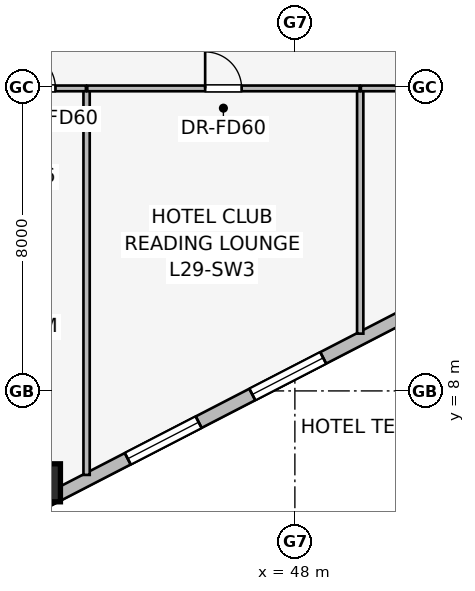
"""IFC4 building model, lengths in metres.
Left out: names, types, materials, properties, quantities, classifications, styles, units other than length and angle.
Written with IfcOpenShell. Run it as: python <this file> out.ifc"""

import sys

from ifc_helpers import new_model, si_unit, direction, frame, frame_2d, origin, origin_2d, place, context, subcontext, project, spatial, rectangle, extrude, element, fill, save


model = new_model("IFC4")
c1 = context("Model", 3, precision=1e-05, world=origin(), true_north=direction((0.0, 1.0)))
c2 = subcontext(c1, "Body", "Model", "MODEL_VIEW")
j1 = project(units=[si_unit("LENGTHUNIT", "METRE"), si_unit("PLANEANGLEUNIT", "RADIAN")], contexts=[c1])
p1 = place(None, origin())
s1 = spatial("IfcSite", under=j1, at=p1, CompositionType="ELEMENT")
p2 = place(p1, origin())
s2 = spatial("IfcBuilding", under=s1, at=p2, CompositionType="ELEMENT")
p3 = place(p2, frame((0.0, 0.0, 111.9)))
s3 = spatial("IfcBuildingStorey", under=s2, at=p3, CompositionType="ELEMENT", Elevation=111.9)
p4 = place(p3, frame((41.331, 5.582, 0.0), z_axis=(0.0, 0.0, 1.0), x_axis=(1.0, 0.0, 0.0)))
e1 = element("IfcColumn", 1, at=p4, inside=s3, PredefinedType="COLUMN", context=c2, shape_type="SweptSolid", body=[
    extrude(rectangle(XDim=1.0, YDim=1.0, at=origin_2d()), origin(), (0.0, 0.0, 1.0), 3.45),
])
p5 = place(p3, frame((54.831, 12.01, 0.0), z_axis=(0.0, 0.0, 1.0), x_axis=(-0.888613612362, -0.458656568606, 0.0)))
e2 = element("IfcWall", 2, at=p5, inside=s3, PredefinedType="STANDARD", context=c2, shape_type="SweptSolid", body=[
    extrude(rectangle(XDim=18.681, YDim=0.34, at=frame_2d((9.34, 0.0))), origin(), (0.0, 0.0, 1.0), 3.16),
])
p6 = place(p5, frame((1.023, 0.0, 0.75)))
e3 = element("IfcOpeningElement", 3, at=p6, cuts=e2, PredefinedType="OPENING", context=c2, shape_type="SweptSolid", body=[
    extrude(rectangle(XDim=1.6, YDim=1.55, at=frame_2d((0.8, 0.775))), frame((0.0, 0.18, 0.0), z_axis=(0.0, -1.0, 0.0), x_axis=(1.0, 0.0, 0.0)), (0.0, 0.0, 1.0), 0.36),
])
p7 = place(p5, frame((6.848, 0.0, 0.75)))
e4 = element("IfcOpeningElement", 4, at=p7, cuts=e2, PredefinedType="OPENING", context=c2, shape_type="SweptSolid", body=[
    extrude(rectangle(XDim=2.1, YDim=1.5, at=frame_2d((1.05, 0.75))), frame((0.0, 0.18, 0.0), z_axis=(0.0, -1.0, 0.0), x_axis=(1.0, 0.0, 0.0)), (0.0, 0.0, 1.0), 0.36),
])
p8 = place(p5, frame((10.536, 0.0, 0.75)))
e5 = element("IfcOpeningElement", 5, at=p8, cuts=e2, PredefinedType="OPENING", context=c2, shape_type="SweptSolid", body=[
    extrude(rectangle(XDim=2.1, YDim=1.5, at=frame_2d((1.05, 0.75))), frame((0.0, 0.18, 0.0), z_axis=(0.0, -1.0, 0.0), x_axis=(1.0, 0.0, 0.0)), (0.0, 0.0, 1.0), 0.36),
])
p9 = place(p5, frame((16.058, 0.0, 0.75)))
e6 = element("IfcOpeningElement", 6, at=p9, cuts=e2, PredefinedType="OPENING", context=c2, shape_type="SweptSolid", body=[
    extrude(rectangle(XDim=1.6, YDim=1.55, at=frame_2d((0.8, 0.775))), frame((0.0, 0.18, 0.0), z_axis=(0.0, -1.0, 0.0), x_axis=(1.0, 0.0, 0.0)), (0.0, 0.0, 1.0), 0.36),
])
p10 = place(p3, frame((42.519, 5.79, 0.0), z_axis=(0.0, 0.0, 1.0), x_axis=(0.0, 1.0, 0.0)))
e7 = element("IfcWall", 7, at=p10, inside=s3, PredefinedType="PARTITIONING", context=c2, shape_type="SweptSolid", body=[
    extrude(rectangle(XDim=10.14, YDim=0.165, at=frame_2d((5.07, 0.0))), origin(), (0.0, 0.0, 1.0), 3.16),
])
p11 = place(p3, frame((49.719, 9.507, 0.0), z_axis=(0.0, 0.0, 1.0), x_axis=(0.0, 1.0, 0.0)))
e8 = element("IfcWall", 8, at=p11, inside=s3, PredefinedType="PARTITIONING", context=c2, shape_type="SweptSolid", body=[
    extrude(rectangle(XDim=6.423, YDim=0.165, at=frame_2d((3.211, 0.0))), origin(), (0.0, 0.0, 1.0), 3.16),
])
p12 = place(p3, frame((37.738, 15.96, 0.0), z_axis=(0.0, 0.0, 1.0), x_axis=(1.0, 0.0, 0.0)))
e9 = element("IfcWall", 9, at=p12, inside=s3, PredefinedType="PARTITIONING", context=c2, shape_type="SweptSolid", body=[
    extrude(rectangle(XDim=4.763, YDim=0.15, at=frame_2d((2.381, 0.0))), origin(), (0.0, 0.0, 1.0), 3.16),
])
p13 = place(p12, frame((3.002, 0.0, 0.0)))
e10 = element("IfcOpeningElement", 10, at=p13, cuts=e9, PredefinedType="OPENING", context=c2, shape_type="SweptSolid", body=[
    extrude(rectangle(XDim=0.96, YDim=2.0, at=frame_2d((0.48, 1.0))), frame((0.0, 0.085, 0.0), z_axis=(0.0, -1.0, 0.0), x_axis=(1.0, 0.0, 0.0)), (0.0, 0.0, 1.0), 0.17),
])
p14 = place(p3, frame((42.537, 15.96, 0.0), z_axis=(0.0, 0.0, 1.0), x_axis=(1.0, 0.0, 0.0)))
e11 = element("IfcWall", 11, at=p14, inside=s3, PredefinedType="PARTITIONING", context=c2, shape_type="SweptSolid", body=[
    extrude(rectangle(XDim=7.164, YDim=0.15, at=frame_2d((3.582, 0.0))), origin(), (0.0, 0.0, 1.0), 3.16),
])
p15 = place(p14, frame((3.102, 0.0, 0.0)))
e12 = element("IfcOpeningElement", 12, at=p15, cuts=e11, PredefinedType="OPENING", context=c2, shape_type="SweptSolid", body=[
    extrude(rectangle(XDim=0.96, YDim=2.0, at=frame_2d((0.48, 1.0))), frame((0.0, 0.085, 0.0), z_axis=(0.0, -1.0, 0.0), x_axis=(1.0, 0.0, 0.0)), (0.0, 0.0, 1.0), 0.17),
])
p16 = place(p3, frame((49.737, 15.96, 0.0), z_axis=(0.0, 0.0, 1.0), x_axis=(1.0, 0.0, 0.0)))
e13 = element("IfcWall", 13, at=p16, inside=s3, PredefinedType="PARTITIONING", context=c2, shape_type="SweptSolid", body=[
    extrude(rectangle(XDim=7.471, YDim=0.15, at=frame_2d((3.735, 0.0))), origin(), (0.0, 0.0, 1.0), 3.16),
])
p17 = place(p16, frame((3.269, 0.0, 0.0)))
e14 = element("IfcOpeningElement", 14, at=p17, cuts=e13, PredefinedType="OPENING", context=c2, shape_type="SweptSolid", body=[
    extrude(rectangle(XDim=0.96, YDim=2.0, at=frame_2d((0.48, 1.0))), frame((0.0, 0.085, 0.0), z_axis=(0.0, -1.0, 0.0), x_axis=(1.0, 0.0, 0.0)), (0.0, 0.0, 1.0), 0.17),
])
p18 = place(p7, origin())
e15 = element("IfcWindow", 15, at=p18, inside=s3, PartitioningType="SINGLE_PANEL", PredefinedType="WINDOW", context=c2, shape_type="SweptSolid", body=[
    extrude(rectangle(XDim=2.1, YDim=1.5, at=frame_2d((1.05, 0.75))), frame((0.0, 0.03, 0.0), z_axis=(0.0, -1.0, 0.0), x_axis=(1.0, 0.0, 0.0)), (0.0, 0.0, 1.0), 0.06),
])
fill(e4, e15)
p19 = place(p8, origin())
e16 = element("IfcWindow", 16, at=p19, inside=s3, PartitioningType="SINGLE_PANEL", PredefinedType="WINDOW", context=c2, shape_type="SweptSolid", body=[
    extrude(rectangle(XDim=2.1, YDim=1.5, at=frame_2d((1.05, 0.75))), frame((0.0, 0.03, 0.0), z_axis=(0.0, -1.0, 0.0), x_axis=(1.0, 0.0, 0.0)), (0.0, 0.0, 1.0), 0.06),
])
fill(e5, e16)
p20 = place(p13, origin())
e17 = element("IfcDoor", 17, at=p20, inside=s3, OperationType="SINGLE_SWING_LEFT", PredefinedType="DOOR", context=c2, shape_type="SweptSolid", body=[
    extrude(rectangle(XDim=0.96, YDim=2.0, at=frame_2d((0.48, 1.0))), frame((0.0, 0.025, 0.0), z_axis=(0.0, -1.0, 0.0), x_axis=(1.0, 0.0, 0.0)), (0.0, 0.0, 1.0), 0.05),
])
fill(e10, e17)
p21 = place(p15, origin())
e18 = element("IfcDoor", 18, at=p21, inside=s3, OperationType="SINGLE_SWING_LEFT", PredefinedType="DOOR", context=c2, shape_type="SweptSolid", body=[
    extrude(rectangle(XDim=0.96, YDim=2.0, at=frame_2d((0.48, 1.0))), frame((0.0, 0.025, 0.0), z_axis=(0.0, -1.0, 0.0), x_axis=(1.0, 0.0, 0.0)), (0.0, 0.0, 1.0), 0.05),
])
fill(e12, e18)
save(model, sys.argv[1])
